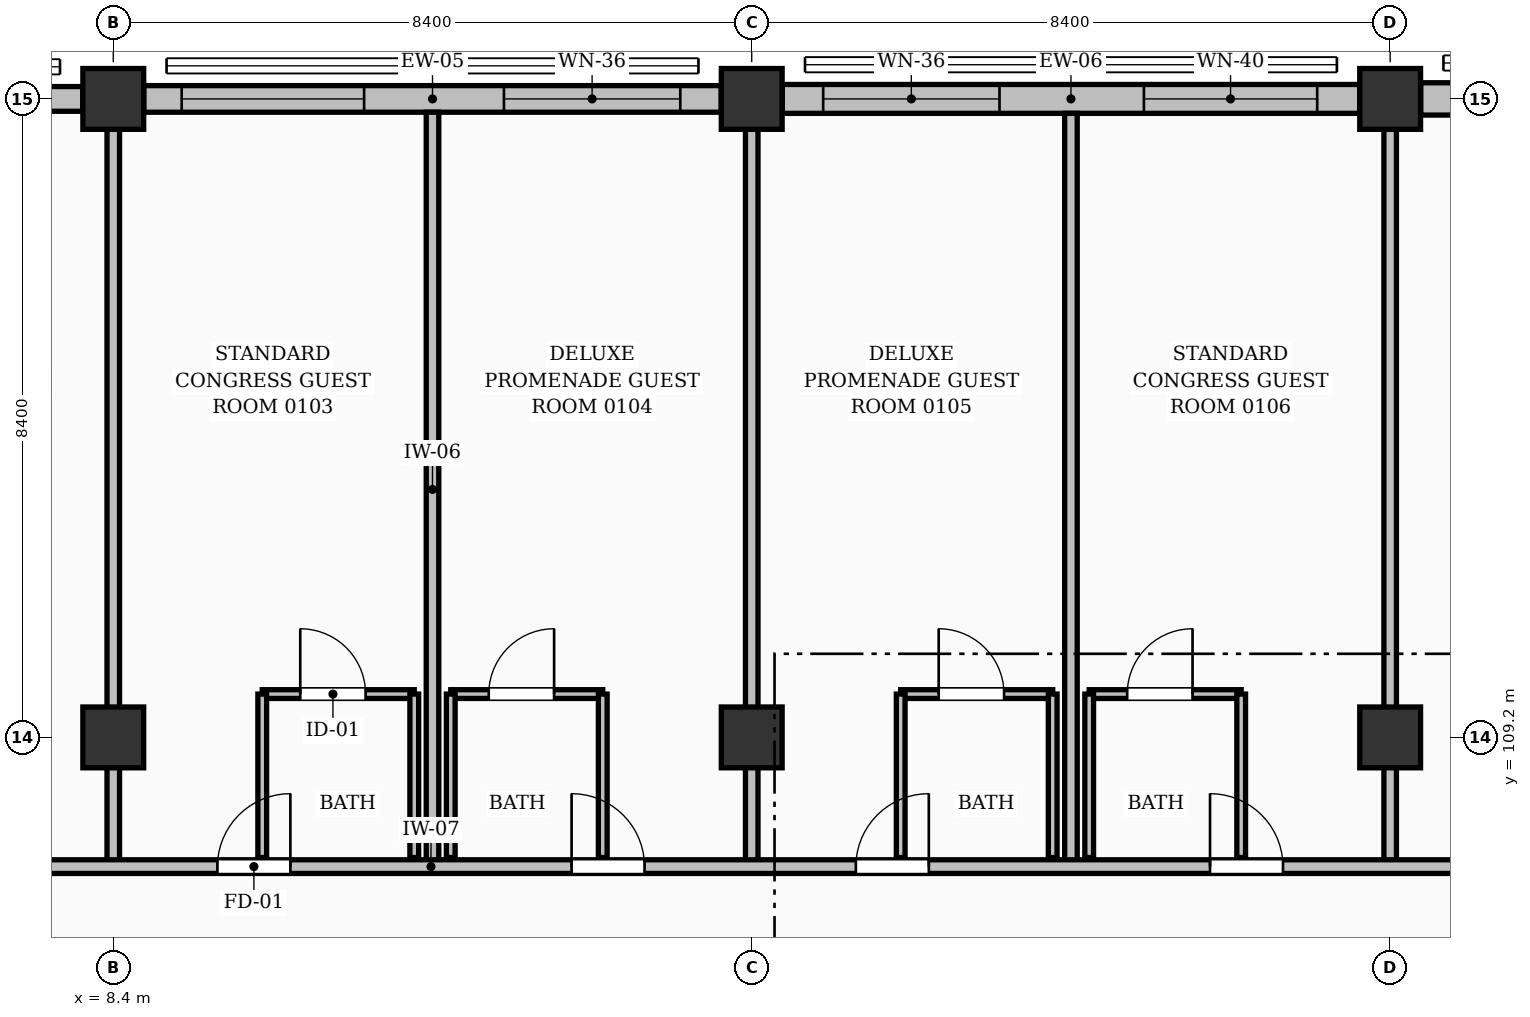
"""IFC4 building model, lengths in metres.
Left out: names, types, materials, properties, quantities, classifications, styles, units other than length and angle.
Written with IfcOpenShell. Run it as: python <this file> out.ifc"""

import sys

from ifc_helpers import new_model, si_unit, direction, frame, frame_2d, origin, origin_2d, place, context, subcontext, project, spatial, rectangle, extrude, element, fill, save


model = new_model("IFC4")
c1 = context("Model", 3, precision=1e-05, world=origin(), true_north=direction((0.0, 1.0)))
c2 = subcontext(c1, "Body", "Model", "MODEL_VIEW")
j1 = project(units=[si_unit("LENGTHUNIT", "METRE"), si_unit("PLANEANGLEUNIT", "RADIAN")], contexts=[c1])
p1 = place(None, origin())
s1 = spatial("IfcSite", under=j1, at=p1, CompositionType="ELEMENT")
p2 = place(p1, origin())
s2 = spatial("IfcBuilding", under=s1, at=p2, CompositionType="ELEMENT")
p3 = place(p2, frame((0.0, 0.0, 3.92)))
s3 = spatial("IfcBuildingStorey", under=s2, at=p3, CompositionType="ELEMENT", Elevation=3.92)
for number, where, z_axis, x_axis in (
    (1, (8.4, 109.2, 0.0), (0.0, 0.0, 1.0), (1.0, 0.0, 0.0)),
    (2, (8.4, 117.6, 0.0), (0.0, 0.0, 1.0), (1.0, 0.0, 0.0)),
    (3, (16.8, 109.2, 0.0), (0.0, 0.0, 1.0), (1.0, 0.0, 0.0)),
    (4, (16.8, 117.6, 0.0), (0.0, 0.0, 1.0), (1.0, 0.0, 0.0)),
    (5, (25.2, 109.2, 0.0), (0.0, 0.0, 1.0), (1.0, 0.0, 0.0)),
    (6, (25.2, 117.6, 0.0), (0.0, 0.0, 1.0), (1.0, 0.0, 0.0)),
):
    element("IfcColumn", number, at=place(p3, frame(where, z_axis=z_axis, x_axis=x_axis)), inside=s3, PredefinedType="COLUMN", context=c2, shape_type="SweptSolid", body=[
        extrude(rectangle(XDim=0.8, YDim=0.8, at=origin_2d()), origin(), (0.0, 0.0, 1.0), 3.64),
    ])
p4 = place(p3, frame((0.451, 117.6, 0.0), z_axis=(0.0, 0.0, 1.0), x_axis=(1.0, 0.0, 0.0)))
e7 = element("IfcWall", 7, at=p4, inside=s3, PredefinedType="SOLIDWALL", context=c2, shape_type="SweptSolid", body=[
    extrude(rectangle(XDim=7.548, YDim=0.325, at=frame_2d((3.774, 0.0))), origin(), (0.0, 0.0, 1.0), 2.445),
])
p5 = place(p4, frame((0.474, 0.0, 0.25)))
e8 = element("IfcOpeningElement", 8, at=p5, cuts=e7, PredefinedType="OPENING", context=c2, shape_type="SweptSolid", body=[
    extrude(rectangle(XDim=2.35, YDim=1.95, at=frame_2d((1.175, 0.975))), frame((0.0, 0.172, 0.0), z_axis=(0.0, -1.0, 0.0), x_axis=(1.0, 0.0, 0.0)), (0.0, 0.0, 1.0), 0.345),
])
p6 = place(p4, frame((4.649, 0.0, 0.25)))
e9 = element("IfcOpeningElement", 9, at=p6, cuts=e7, PredefinedType="OPENING", context=c2, shape_type="SweptSolid", body=[
    extrude(rectangle(XDim=2.4, YDim=1.75, at=frame_2d((1.2, 0.875))), frame((0.0, 0.172, 0.0), z_axis=(0.0, -1.0, 0.0), x_axis=(1.0, 0.0, 0.0)), (0.0, 0.0, 1.0), 0.345),
])
p7 = place(p3, frame((8.801, 117.6, 0.0), z_axis=(0.0, 0.0, 1.0), x_axis=(1.0, 0.0, 0.0)))
e10 = element("IfcWall", 10, at=p7, inside=s3, PredefinedType="SOLIDWALL", context=c2, shape_type="SweptSolid", body=[
    extrude(rectangle(XDim=7.598, YDim=0.35, at=frame_2d((3.799, 0.0))), origin(), (0.0, 0.0, 1.0), 2.445),
])
p8 = place(p7, frame((0.499, 0.0, 0.25)))
e11 = element("IfcOpeningElement", 11, at=p8, cuts=e10, PredefinedType="OPENING", context=c2, shape_type="SweptSolid", body=[
    extrude(rectangle(XDim=2.4, YDim=1.75, at=frame_2d((1.2, 0.875))), frame((0.0, 0.185, 0.0), z_axis=(0.0, -1.0, 0.0), x_axis=(1.0, 0.0, 0.0)), (0.0, 0.0, 1.0), 0.37),
])
p9 = place(p7, frame((4.739, 0.0, 0.25)))
e12 = element("IfcOpeningElement", 12, at=p9, cuts=e10, PredefinedType="OPENING", context=c2, shape_type="SweptSolid", body=[
    extrude(rectangle(XDim=2.32, YDim=1.9, at=frame_2d((1.16, 0.95))), frame((0.0, 0.185, 0.0), z_axis=(0.0, -1.0, 0.0), x_axis=(1.0, 0.0, 0.0)), (0.0, 0.0, 1.0), 0.37),
])
p10 = place(p3, frame((17.201, 117.6, 0.0), z_axis=(0.0, 0.0, 1.0), x_axis=(1.0, 0.0, 0.0)))
e13 = element("IfcWall", 13, at=p10, inside=s3, PredefinedType="SOLIDWALL", context=c2, shape_type="SweptSolid", body=[
    extrude(rectangle(XDim=7.598, YDim=0.38, at=frame_2d((3.799, 0.0))), origin(), (0.0, 0.0, 1.0), 2.445),
])
p11 = place(p10, frame((0.539, 0.0, 0.25)))
e14 = element("IfcOpeningElement", 14, at=p11, cuts=e13, PredefinedType="OPENING", context=c2, shape_type="SweptSolid", body=[
    extrude(rectangle(XDim=2.32, YDim=1.9, at=frame_2d((1.16, 0.95))), frame((0.0, 0.2, 0.0), z_axis=(0.0, -1.0, 0.0), x_axis=(1.0, 0.0, 0.0)), (0.0, 0.0, 1.0), 0.4),
])
p12 = place(p10, frame((4.759, 0.0, 0.25)))
e15 = element("IfcOpeningElement", 15, at=p12, cuts=e13, PredefinedType="OPENING", context=c2, shape_type="SweptSolid", body=[
    extrude(rectangle(XDim=2.28, YDim=2.0, at=frame_2d((1.14, 1.0))), frame((0.0, 0.2, 0.0), z_axis=(0.0, -1.0, 0.0), x_axis=(1.0, 0.0, 0.0)), (0.0, 0.0, 1.0), 0.4),
])
p13 = place(p3, frame((25.601, 117.6, 0.0), z_axis=(0.0, 0.0, 1.0), x_axis=(1.0, 0.0, 0.0)))
e16 = element("IfcWall", 16, at=p13, inside=s3, PredefinedType="SOLIDWALL", context=c2, shape_type="SweptSolid", body=[
    extrude(rectangle(XDim=7.598, YDim=0.425, at=frame_2d((3.799, 0.0))), origin(), (0.0, 0.0, 1.0), 2.445),
])
p14 = place(p13, frame((0.559, 0.0, 0.25)))
e17 = element("IfcOpeningElement", 17, at=p14, cuts=e16, PredefinedType="OPENING", context=c2, shape_type="SweptSolid", body=[
    extrude(rectangle(XDim=2.28, YDim=2.0, at=frame_2d((1.14, 1.0))), frame((0.0, 0.223, 0.0), z_axis=(0.0, -1.0, 0.0), x_axis=(1.0, 0.0, 0.0)), (0.0, 0.0, 1.0), 0.445),
])
p15 = place(p13, frame((4.774, 0.0, 0.25)))
e18 = element("IfcOpeningElement", 18, at=p15, cuts=e16, PredefinedType="OPENING", context=c2, shape_type="SweptSolid", body=[
    extrude(rectangle(XDim=2.25, YDim=1.85, at=frame_2d((1.125, 0.925))), frame((0.0, 0.223, 0.0), z_axis=(0.0, -1.0, 0.0), x_axis=(1.0, 0.0, 0.0)), (0.0, 0.0, 1.0), 0.445),
])
p16 = place(p3, frame((10.36, 109.77, 0.0), z_axis=(0.0, 0.0, 1.0), x_axis=(1.0, 0.0, 0.0)))
e19 = element("IfcWall", 19, at=p16, inside=s3, PredefinedType="PARTITIONING", context=c2, shape_type="SweptSolid", body=[
    extrude(rectangle(XDim=2.0, YDim=0.115, at=frame_2d((1.0, 0.0))), origin(), (0.0, 0.0, 1.0), 3.36),
])
p17 = place(p16, frame((0.5, 0.0, 0.0)))
e20 = element("IfcOpeningElement", 20, at=p17, cuts=e19, PredefinedType="OPENING", context=c2, shape_type="SweptSolid", body=[
    extrude(rectangle(XDim=0.86, YDim=2.05, at=frame_2d((0.43, 1.025))), frame((0.0, 0.067, 0.0), z_axis=(0.0, -1.0, 0.0), x_axis=(1.0, 0.0, 0.0)), (0.0, 0.0, 1.0), 0.135),
])
p18 = place(p3, frame((10.36, 107.62, 0.0), z_axis=(0.0, 0.0, 1.0), x_axis=(0.0, 1.0, 0.0)))
e21 = element("IfcWall", 21, at=p18, inside=s3, PredefinedType="PARTITIONING", context=c2, shape_type="SweptSolid", body=[
    extrude(rectangle(XDim=2.15, YDim=0.115, at=frame_2d((1.075, 0.0))), origin(), (0.0, 0.0, 1.0), 2.882),
])
p19 = place(p3, frame((12.36, 107.62, 0.0), z_axis=(0.0, 0.0, 1.0), x_axis=(0.0, 1.0, 0.0)))
e22 = element("IfcWall", 22, at=p19, inside=s3, PredefinedType="PARTITIONING", context=c2, shape_type="SweptSolid", body=[
    extrude(rectangle(XDim=2.15, YDim=0.115, at=frame_2d((1.075, 0.0))), origin(), (0.0, 0.0, 1.0), 3.36),
])
p20 = place(p3, frame((12.84, 109.77, 0.0), z_axis=(0.0, 0.0, 1.0), x_axis=(1.0, 0.0, 0.0)))
e23 = element("IfcWall", 23, at=p20, inside=s3, PredefinedType="PARTITIONING", context=c2, shape_type="SweptSolid", body=[
    extrude(rectangle(XDim=2.0, YDim=0.115, at=frame_2d((1.0, 0.0))), origin(), (0.0, 0.0, 1.0), 3.36),
])
p21 = place(p20, frame((0.5, 0.0, 0.0)))
e24 = element("IfcOpeningElement", 24, at=p21, cuts=e23, PredefinedType="OPENING", context=c2, shape_type="SweptSolid", body=[
    extrude(rectangle(XDim=0.86, YDim=2.05, at=frame_2d((0.43, 1.025))), frame((0.0, 0.067, 0.0), z_axis=(0.0, -1.0, 0.0), x_axis=(1.0, 0.0, 0.0)), (0.0, 0.0, 1.0), 0.135),
])
p22 = place(p3, frame((12.84, 107.62, 0.0), z_axis=(0.0, 0.0, 1.0), x_axis=(0.0, 1.0, 0.0)))
e25 = element("IfcWall", 25, at=p22, inside=s3, PredefinedType="PARTITIONING", context=c2, shape_type="SweptSolid", body=[
    extrude(rectangle(XDim=2.15, YDim=0.115, at=frame_2d((1.075, 0.0))), origin(), (0.0, 0.0, 1.0), 3.36),
])
p23 = place(p3, frame((14.84, 107.62, 0.0), z_axis=(0.0, 0.0, 1.0), x_axis=(0.0, 1.0, 0.0)))
e26 = element("IfcWall", 26, at=p23, inside=s3, PredefinedType="PARTITIONING", context=c2, shape_type="SweptSolid", body=[
    extrude(rectangle(XDim=2.15, YDim=0.115, at=frame_2d((1.075, 0.0))), origin(), (0.0, 0.0, 1.0), 2.882),
])
p24 = place(p3, frame((12.6, 107.5, 0.0), z_axis=(0.0, 0.0, 1.0), x_axis=(0.0, 1.0, 0.0)))
e27 = element("IfcWall", 27, at=p24, inside=s3, PredefinedType="PARTITIONING", context=c2, shape_type="SweptSolid", body=[
    extrude(rectangle(XDim=9.925, YDim=0.165, at=frame_2d((4.962, 0.0))), origin(), (0.0, 0.0, 1.0), 3.36),
])
p25 = place(p3, frame((8.4, 107.5, 0.0), z_axis=(0.0, 0.0, 1.0), x_axis=(0.0, 1.0, 0.0)))
e28 = element("IfcWall", 28, at=p25, inside=s3, PredefinedType="PARTITIONING", context=c2, shape_type="SweptSolid", body=[
    extrude(rectangle(XDim=9.75, YDim=0.165, at=frame_2d((4.875, 0.0))), origin(), (0.0, 0.0, 1.0), 2.395),
])
p26 = place(p3, frame((18.76, 109.77, 0.0), z_axis=(0.0, 0.0, 1.0), x_axis=(1.0, 0.0, 0.0)))
e29 = element("IfcWall", 29, at=p26, inside=s3, PredefinedType="PARTITIONING", context=c2, shape_type="SweptSolid", body=[
    extrude(rectangle(XDim=2.0, YDim=0.115, at=frame_2d((1.0, 0.0))), origin(), (0.0, 0.0, 1.0), 3.36),
])
p27 = place(p26, frame((0.5, 0.0, 0.0)))
e30 = element("IfcOpeningElement", 30, at=p27, cuts=e29, PredefinedType="OPENING", context=c2, shape_type="SweptSolid", body=[
    extrude(rectangle(XDim=0.86, YDim=2.05, at=frame_2d((0.43, 1.025))), frame((0.0, 0.067, 0.0), z_axis=(0.0, -1.0, 0.0), x_axis=(1.0, 0.0, 0.0)), (0.0, 0.0, 1.0), 0.135),
])
for number, where, z_axis, x_axis in (
    (31, (18.76, 107.62, 0.0), (0.0, 0.0, 1.0), (0.0, 1.0, 0.0)),
    (32, (20.76, 107.62, 0.0), (0.0, 0.0, 1.0), (0.0, 1.0, 0.0)),
):
    element("IfcWall", number, at=place(p3, frame(where, z_axis=z_axis, x_axis=x_axis)), inside=s3, PredefinedType="PARTITIONING", context=c2, shape_type="SweptSolid", body=[
        extrude(rectangle(XDim=2.15, YDim=0.115, at=frame_2d((1.075, 0.0))), origin(), (0.0, 0.0, 1.0), 3.36),
    ])
p28 = place(p3, frame((21.24, 109.77, 0.0), z_axis=(0.0, 0.0, 1.0), x_axis=(1.0, 0.0, 0.0)))
e33 = element("IfcWall", 33, at=p28, inside=s3, PredefinedType="PARTITIONING", context=c2, shape_type="SweptSolid", body=[
    extrude(rectangle(XDim=2.0, YDim=0.115, at=frame_2d((1.0, 0.0))), origin(), (0.0, 0.0, 1.0), 3.36),
])
p29 = place(p28, frame((0.5, 0.0, 0.0)))
e34 = element("IfcOpeningElement", 34, at=p29, cuts=e33, PredefinedType="OPENING", context=c2, shape_type="SweptSolid", body=[
    extrude(rectangle(XDim=0.86, YDim=2.05, at=frame_2d((0.43, 1.025))), frame((0.0, 0.067, 0.0), z_axis=(0.0, -1.0, 0.0), x_axis=(1.0, 0.0, 0.0)), (0.0, 0.0, 1.0), 0.135),
])
for number, where, z_axis, x_axis in (
    (35, (21.24, 107.62, 0.0), (0.0, 0.0, 1.0), (0.0, 1.0, 0.0)),
    (36, (23.24, 107.62, 0.0), (0.0, 0.0, 1.0), (0.0, 1.0, 0.0)),
):
    element("IfcWall", number, at=place(p3, frame(where, z_axis=z_axis, x_axis=x_axis)), inside=s3, PredefinedType="PARTITIONING", context=c2, shape_type="SweptSolid", body=[
        extrude(rectangle(XDim=2.15, YDim=0.115, at=frame_2d((1.075, 0.0))), origin(), (0.0, 0.0, 1.0), 3.36),
    ])
p30 = place(p3, frame((21.0, 107.5, 0.0), z_axis=(0.0, 0.0, 1.0), x_axis=(0.0, 1.0, 0.0)))
e37 = element("IfcWall", 37, at=p30, inside=s3, PredefinedType="PARTITIONING", context=c2, shape_type="SweptSolid", body=[
    extrude(rectangle(XDim=9.91, YDim=0.165, at=frame_2d((4.955, 0.0))), origin(), (0.0, 0.0, 1.0), 3.36),
])
for number, where, z_axis, x_axis in (
    (38, (16.8, 107.5, 0.0), (0.0, 0.0, 1.0), (0.0, 1.0, 0.0)),
    (39, (25.2, 107.5, 0.0), (0.0, 0.0, 1.0), (0.0, 1.0, 0.0)),
):
    element("IfcWall", number, at=place(p3, frame(where, z_axis=z_axis, x_axis=x_axis)), inside=s3, PredefinedType="PARTITIONING", context=c2, shape_type="SweptSolid", body=[
        extrude(rectangle(XDim=9.75, YDim=0.165, at=frame_2d((4.875, 0.0))), origin(), (0.0, 0.0, 1.0), 2.395),
    ])
p31 = place(p3, frame((0.19, 107.5, 0.0), z_axis=(0.0, 0.0, 1.0), x_axis=(1.0, 0.0, 0.0)))
e40 = element("IfcWall", 40, at=p31, inside=s3, PredefinedType="PARTITIONING", context=c2, shape_type="SweptSolid", body=[
    extrude(rectangle(XDim=34.18, YDim=0.18, at=frame_2d((17.09, 0.0))), origin(), (0.0, 0.0, 1.0), 3.36),
])
p32 = place(p31, frame((1.18, 0.0, 0.0)))
e41 = element("IfcOpeningElement", 41, at=p32, cuts=e40, PredefinedType="OPENING", context=c2, shape_type="SweptSolid", body=[
    extrude(rectangle(XDim=0.96, YDim=2.15, at=frame_2d((0.48, 1.075))), frame((0.0, 0.1, 0.0), z_axis=(0.0, -1.0, 0.0), x_axis=(1.0, 0.0, 0.0)), (0.0, 0.0, 1.0), 0.2),
])
p33 = place(p31, frame((5.84, 0.0, 0.0)))
e42 = element("IfcOpeningElement", 42, at=p33, cuts=e40, PredefinedType="OPENING", context=c2, shape_type="SweptSolid", body=[
    extrude(rectangle(XDim=0.96, YDim=2.15, at=frame_2d((0.48, 1.075))), frame((0.0, 0.1, 0.0), z_axis=(0.0, -1.0, 0.0), x_axis=(1.0, 0.0, 0.0)), (0.0, 0.0, 1.0), 0.2),
])
p34 = place(p31, frame((9.58, 0.0, 0.0)))
e43 = element("IfcOpeningElement", 43, at=p34, cuts=e40, PredefinedType="OPENING", context=c2, shape_type="SweptSolid", body=[
    extrude(rectangle(XDim=0.96, YDim=2.15, at=frame_2d((0.48, 1.075))), frame((0.0, 0.1, 0.0), z_axis=(0.0, -1.0, 0.0), x_axis=(1.0, 0.0, 0.0)), (0.0, 0.0, 1.0), 0.2),
])
p35 = place(p31, frame((14.24, 0.0, 0.0)))
e44 = element("IfcOpeningElement", 44, at=p35, cuts=e40, PredefinedType="OPENING", context=c2, shape_type="SweptSolid", body=[
    extrude(rectangle(XDim=0.96, YDim=2.15, at=frame_2d((0.48, 1.075))), frame((0.0, 0.1, 0.0), z_axis=(0.0, -1.0, 0.0), x_axis=(1.0, 0.0, 0.0)), (0.0, 0.0, 1.0), 0.2),
])
p36 = place(p31, frame((17.98, 0.0, 0.0)))
e45 = element("IfcOpeningElement", 45, at=p36, cuts=e40, PredefinedType="OPENING", context=c2, shape_type="SweptSolid", body=[
    extrude(rectangle(XDim=0.96, YDim=2.15, at=frame_2d((0.48, 1.075))), frame((0.0, 0.1, 0.0), z_axis=(0.0, -1.0, 0.0), x_axis=(1.0, 0.0, 0.0)), (0.0, 0.0, 1.0), 0.2),
])
p37 = place(p31, frame((22.64, 0.0, 0.0)))
e46 = element("IfcOpeningElement", 46, at=p37, cuts=e40, PredefinedType="OPENING", context=c2, shape_type="SweptSolid", body=[
    extrude(rectangle(XDim=0.96, YDim=2.15, at=frame_2d((0.48, 1.075))), frame((0.0, 0.1, 0.0), z_axis=(0.0, -1.0, 0.0), x_axis=(1.0, 0.0, 0.0)), (0.0, 0.0, 1.0), 0.2),
])
p38 = place(p31, frame((26.38, 0.0, 0.0)))
e47 = element("IfcOpeningElement", 47, at=p38, cuts=e40, PredefinedType="OPENING", context=c2, shape_type="SweptSolid", body=[
    extrude(rectangle(XDim=0.96, YDim=2.15, at=frame_2d((0.48, 1.075))), frame((0.0, 0.1, 0.0), z_axis=(0.0, -1.0, 0.0), x_axis=(1.0, 0.0, 0.0)), (0.0, 0.0, 1.0), 0.2),
])
p39 = place(p31, frame((31.04, 0.0, 0.0)))
e48 = element("IfcOpeningElement", 48, at=p39, cuts=e40, PredefinedType="OPENING", context=c2, shape_type="SweptSolid", body=[
    extrude(rectangle(XDim=0.96, YDim=2.15, at=frame_2d((0.48, 1.075))), frame((0.0, 0.1, 0.0), z_axis=(0.0, -1.0, 0.0), x_axis=(1.0, 0.0, 0.0)), (0.0, 0.0, 1.0), 0.2),
])
p40 = place(p8, origin())
e49 = element("IfcWindow", 49, at=p40, inside=s3, PartitioningType="DOUBLE_PANEL_VERTICAL", PredefinedType="WINDOW", context=c2, shape_type="SweptSolid", body=[
    extrude(rectangle(XDim=2.4, YDim=1.75, at=frame_2d((1.2, 0.875))), frame((0.0, 0.03, 0.0), z_axis=(0.0, -1.0, 0.0), x_axis=(1.0, 0.0, 0.0)), (0.0, 0.0, 1.0), 0.06),
])
fill(e11, e49)
p41 = place(p9, origin())
e50 = element("IfcWindow", 50, at=p41, inside=s3, PartitioningType="DOUBLE_PANEL_VERTICAL", PredefinedType="WINDOW", context=c2, shape_type="SweptSolid", body=[
    extrude(rectangle(XDim=2.32, YDim=1.9, at=frame_2d((1.16, 0.95))), frame((0.0, 0.03, 0.0), z_axis=(0.0, -1.0, 0.0), x_axis=(1.0, 0.0, 0.0)), (0.0, 0.0, 1.0), 0.06),
])
fill(e12, e50)
p42 = place(p11, origin())
e51 = element("IfcWindow", 51, at=p42, inside=s3, PartitioningType="DOUBLE_PANEL_VERTICAL", PredefinedType="WINDOW", context=c2, shape_type="SweptSolid", body=[
    extrude(rectangle(XDim=2.32, YDim=1.9, at=frame_2d((1.16, 0.95))), frame((0.0, 0.03, 0.0), z_axis=(0.0, -1.0, 0.0), x_axis=(1.0, 0.0, 0.0)), (0.0, 0.0, 1.0), 0.06),
])
fill(e14, e51)
p43 = place(p12, origin())
e52 = element("IfcWindow", 52, at=p43, inside=s3, PartitioningType="DOUBLE_PANEL_VERTICAL", PredefinedType="WINDOW", context=c2, shape_type="SweptSolid", body=[
    extrude(rectangle(XDim=2.28, YDim=2.0, at=frame_2d((1.14, 1.0))), frame((0.0, 0.03, 0.0), z_axis=(0.0, -1.0, 0.0), x_axis=(1.0, 0.0, 0.0)), (0.0, 0.0, 1.0), 0.06),
])
fill(e15, e52)
p44 = place(p17, origin())
e53 = element("IfcDoor", 53, at=p44, inside=s3, OperationType="SINGLE_SWING_LEFT", PredefinedType="DOOR", context=c2, shape_type="SweptSolid", body=[
    extrude(rectangle(XDim=0.86, YDim=2.05, at=frame_2d((0.43, 1.025))), frame((0.0, 0.025, 0.0), z_axis=(0.0, -1.0, 0.0), x_axis=(1.0, 0.0, 0.0)), (0.0, 0.0, 1.0), 0.05),
])
fill(e20, e53)
p45 = place(p21, origin())
e54 = element("IfcDoor", 54, at=p45, inside=s3, OperationType="SINGLE_SWING_RIGHT", PredefinedType="DOOR", context=c2, shape_type="SweptSolid", body=[
    extrude(rectangle(XDim=0.86, YDim=2.05, at=frame_2d((0.43, 1.025))), frame((0.0, 0.025, 0.0), z_axis=(0.0, -1.0, 0.0), x_axis=(1.0, 0.0, 0.0)), (0.0, 0.0, 1.0), 0.05),
])
fill(e24, e54)
p46 = place(p27, origin())
e55 = element("IfcDoor", 55, at=p46, inside=s3, OperationType="SINGLE_SWING_LEFT", PredefinedType="DOOR", context=c2, shape_type="SweptSolid", body=[
    extrude(rectangle(XDim=0.86, YDim=2.05, at=frame_2d((0.43, 1.025))), frame((0.0, 0.025, 0.0), z_axis=(0.0, -1.0, 0.0), x_axis=(1.0, 0.0, 0.0)), (0.0, 0.0, 1.0), 0.05),
])
fill(e30, e55)
p47 = place(p29, origin())
e56 = element("IfcDoor", 56, at=p47, inside=s3, OperationType="SINGLE_SWING_RIGHT", PredefinedType="DOOR", context=c2, shape_type="SweptSolid", body=[
    extrude(rectangle(XDim=0.86, YDim=2.05, at=frame_2d((0.43, 1.025))), frame((0.0, 0.025, 0.0), z_axis=(0.0, -1.0, 0.0), x_axis=(1.0, 0.0, 0.0)), (0.0, 0.0, 1.0), 0.05),
])
fill(e34, e56)
p48 = place(p34, origin())
e57 = element("IfcDoor", 57, at=p48, inside=s3, OperationType="SINGLE_SWING_RIGHT", PredefinedType="DOOR", context=c2, shape_type="SweptSolid", body=[
    extrude(rectangle(XDim=0.96, YDim=2.15, at=frame_2d((0.48, 1.075))), frame((0.0, 0.025, 0.0), z_axis=(0.0, -1.0, 0.0), x_axis=(1.0, 0.0, 0.0)), (0.0, 0.0, 1.0), 0.05),
])
fill(e43, e57)
p49 = place(p35, origin())
e58 = element("IfcDoor", 58, at=p49, inside=s3, OperationType="SINGLE_SWING_LEFT", PredefinedType="DOOR", context=c2, shape_type="SweptSolid", body=[
    extrude(rectangle(XDim=0.96, YDim=2.15, at=frame_2d((0.48, 1.075))), frame((0.0, 0.025, 0.0), z_axis=(0.0, -1.0, 0.0), x_axis=(1.0, 0.0, 0.0)), (0.0, 0.0, 1.0), 0.05),
])
fill(e44, e58)
p50 = place(p36, origin())
e59 = element("IfcDoor", 59, at=p50, inside=s3, OperationType="SINGLE_SWING_RIGHT", PredefinedType="DOOR", context=c2, shape_type="SweptSolid", body=[
    extrude(rectangle(XDim=0.96, YDim=2.15, at=frame_2d((0.48, 1.075))), frame((0.0, 0.025, 0.0), z_axis=(0.0, -1.0, 0.0), x_axis=(1.0, 0.0, 0.0)), (0.0, 0.0, 1.0), 0.05),
])
fill(e45, e59)
p51 = place(p37, origin())
e60 = element("IfcDoor", 60, at=p51, inside=s3, OperationType="SINGLE_SWING_LEFT", PredefinedType="DOOR", context=c2, shape_type="SweptSolid", body=[
    extrude(rectangle(XDim=0.96, YDim=2.15, at=frame_2d((0.48, 1.075))), frame((0.0, 0.025, 0.0), z_axis=(0.0, -1.0, 0.0), x_axis=(1.0, 0.0, 0.0)), (0.0, 0.0, 1.0), 0.05),
])
fill(e46, e60)
save(model, sys.argv[1])
